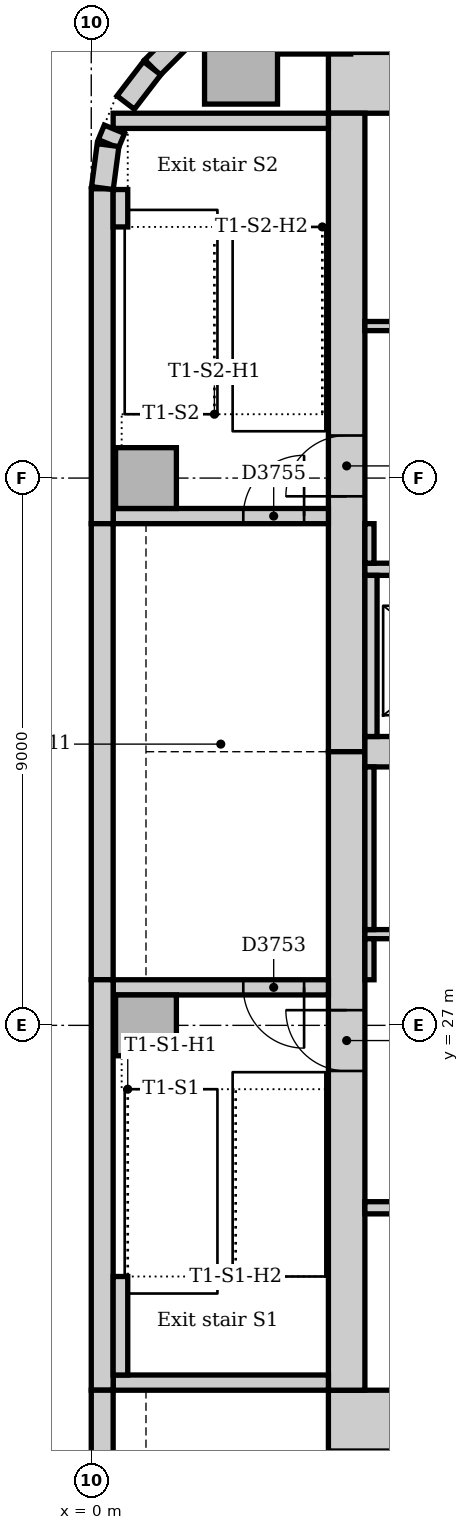
"""IFC4 building model, lengths in metres.
Left out: names, types, materials, properties, quantities, classifications, styles, units other than length and angle.
Written with IfcOpenShell. Run it as: python <this file> out.ifc"""

import sys

from ifc_helpers import new_model, si_unit, direction, frame, frame_2d, origin, origin_2d, place, context, subcontext, project, spatial, rectangle, extrude, element, fill, save


model = new_model("IFC4")
c1 = context("Model", 3, precision=1e-05, world=origin(), true_north=direction((0.0, 1.0)))
c2 = subcontext(c1, "Body", "Model", "MODEL_VIEW")
j1 = project(units=[si_unit("LENGTHUNIT", "METRE"), si_unit("PLANEANGLEUNIT", "RADIAN")], contexts=[c1])
p1 = place(None, origin())
s1 = spatial("IfcSite", under=j1, at=p1, CompositionType="ELEMENT")
p2 = place(p1, origin())
s2 = spatial("IfcBuilding", under=s1, at=p2, CompositionType="ELEMENT")
p3 = place(p2, frame((0.0, 0.0, 83.0)))
s3 = spatial("IfcBuildingStorey", under=s2, at=p3, CompositionType="ELEMENT", Elevation=83.0)
for number, where, z_axis, x_axis in (
    (1, (3.9, 20.5, 0.0), (0.0, 0.0, 1.0), (1.0, 0.0, 0.0)),
    (2, (23.5, 42.5, 0.0), (0.0, 0.0, 1.0), (-1.0, 0.0, 0.0)),
):
    element("IfcWall", number, at=place(p3, frame(where, z_axis=z_axis, x_axis=x_axis)), inside=s3, PredefinedType="SOLIDWALL", context=c2, shape_type="SweptSolid", body=[
        extrude(rectangle(XDim=19.6, YDim=1.0, at=frame_2d((9.8, 0.0))), origin(), (0.0, 0.0, 1.0), 4.0),
    ])
p4 = place(p3, frame((4.2, 42.0, 0.0), z_axis=(0.0, 0.0, 1.0), x_axis=(0.0, -1.0, 0.0)))
e3 = element("IfcWall", 3, at=p4, inside=s3, PredefinedType="SOLIDWALL", context=c2, shape_type="SweptSolid", body=[
    extrude(rectangle(XDim=10.5, YDim=0.6, at=frame_2d((5.25, 0.0))), origin(), (0.0, 0.0, 1.0), 4.0),
])
p5 = place(p4, frame((5.3, 0.0, 0.0)))
e4 = element("IfcOpeningElement", 4, at=p5, cuts=e3, PredefinedType="OPENING", context=c2, shape_type="SweptSolid", body=[
    extrude(rectangle(XDim=1.0, YDim=2.1, at=frame_2d((0.5, 1.05))), frame((0.0, 0.31, 0.0), z_axis=(0.0, -1.0, 0.0), x_axis=(1.0, 0.0, 0.0)), (0.0, 0.0, 1.0), 0.62),
])
p6 = place(p3, frame((4.2, 31.5, 0.0), z_axis=(0.0, 0.0, 1.0), x_axis=(0.0, -1.0, 0.0)))
e5 = element("IfcWall", 5, at=p6, inside=s3, PredefinedType="SOLIDWALL", context=c2, shape_type="SweptSolid", body=[
    extrude(rectangle(XDim=10.5, YDim=0.6, at=frame_2d((5.25, 0.0))), origin(), (0.0, 0.0, 1.0), 4.0),
])
p7 = place(p6, frame((4.25, 0.0, 0.0)))
e6 = element("IfcOpeningElement", 6, at=p7, cuts=e5, PredefinedType="OPENING", context=c2, shape_type="SweptSolid", body=[
    extrude(rectangle(XDim=1.0, YDim=2.1, at=frame_2d((0.5, 1.05))), frame((0.0, 0.31, 0.0), z_axis=(0.0, -1.0, 0.0), x_axis=(1.0, 0.0, 0.0)), (0.0, 0.0, 1.0), 0.62),
])
p8 = place(p3, frame((4.5, 31.5, 0.0), z_axis=(0.0, 0.0, 1.0), x_axis=(1.0, 0.0, 0.0)))
e7 = element("IfcWall", 7, at=p8, inside=s3, PredefinedType="SOLIDWALL", context=c2, shape_type="SweptSolid", body=[
    extrude(rectangle(XDim=18.0, YDim=0.5, at=frame_2d((9.0, 0.0))), origin(), (0.0, 0.0, 1.0), 4.0),
])
p9 = place(p3, frame((0.36, 21.125, 0.0), z_axis=(0.0, 0.0, 1.0), x_axis=(1.0, 0.0, 0.0)))
e8 = element("IfcWall", 8, at=p9, inside=s3, PredefinedType="SOLIDWALL", context=c2, shape_type="SweptSolid", body=[
    extrude(rectangle(XDim=3.54, YDim=0.25, at=frame_2d((1.77, 0.0))), origin(), (0.0, 0.0, 1.0), 4.0),
])
p10 = place(p3, frame((3.9, 27.625, 0.0), z_axis=(0.0, 0.0, 1.0), x_axis=(-1.0, 0.0, 0.0)))
e9 = element("IfcWall", 9, at=p10, inside=s3, PredefinedType="SOLIDWALL", context=c2, shape_type="SweptSolid", body=[
    extrude(rectangle(XDim=3.54, YDim=0.25, at=frame_2d((1.77, 0.0))), origin(), (0.0, 0.0, 1.0), 4.0),
])
p11 = place(p10, frame((0.4, 0.0, 0.0)))
e10 = element("IfcOpeningElement", 10, at=p11, cuts=e9, PredefinedType="OPENING", context=c2, shape_type="SweptSolid", body=[
    extrude(rectangle(XDim=1.0, YDim=2.1, at=frame_2d((0.5, 1.05))), frame((0.0, 0.135, 0.0), z_axis=(0.0, -1.0, 0.0), x_axis=(1.0, 0.0, 0.0)), (0.0, 0.0, 1.0), 0.27),
])
p12 = place(p3, frame((0.36, 35.375, 0.0), z_axis=(0.0, 0.0, 1.0), x_axis=(1.0, 0.0, 0.0)))
e11 = element("IfcWall", 11, at=p12, inside=s3, PredefinedType="SOLIDWALL", context=c2, shape_type="SweptSolid", body=[
    extrude(rectangle(XDim=3.54, YDim=0.25, at=frame_2d((1.77, 0.0))), origin(), (0.0, 0.0, 1.0), 4.0),
])
p13 = place(p12, frame((2.14, 0.0, 0.0)))
e12 = element("IfcOpeningElement", 12, at=p13, cuts=e11, PredefinedType="OPENING", context=c2, shape_type="SweptSolid", body=[
    extrude(rectangle(XDim=1.0, YDim=2.1, at=frame_2d((0.5, 1.05))), frame((0.0, 0.135, 0.0), z_axis=(0.0, -1.0, 0.0), x_axis=(1.0, 0.0, 0.0)), (0.0, 0.0, 1.0), 0.27),
])
p14 = place(p3, frame((3.9, 41.875, 0.0), z_axis=(0.0, 0.0, 1.0), x_axis=(-1.0, 0.0, 0.0)))
e13 = element("IfcWall", 13, at=p14, inside=s3, PredefinedType="SOLIDWALL", context=c2, shape_type="SweptSolid", body=[
    extrude(rectangle(XDim=3.54, YDim=0.25, at=frame_2d((1.77, 0.0))), origin(), (0.0, 0.0, 1.0), 4.0),
])
for number, where, z_axis, x_axis in (
    (14, (3.667, 43.574, 0.0), (0.0, 0.0, 1.0), (1.0, 0.0, 0.0)),
    (15, (2.463, 42.75, 0.0), (0.0, 0.0, 1.0), (1.0, 0.0, 0.0)),
):
    element("IfcColumn", number, at=place(p3, frame(where, z_axis=z_axis, x_axis=x_axis)), inside=s3, PredefinedType="COLUMN", context=c2, shape_type="SweptSolid", body=[
        extrude(rectangle(XDim=1.2, YDim=1.2, at=origin_2d()), origin(), (0.0, 0.0, 1.0), 3.85),
    ])
for number, where, z_axis, x_axis in (
    (16, (0.9, 27.0, 0.0), (0.0, 0.0, 1.0), (1.0, 0.0, 0.0)),
    (17, (0.9, 36.0, 0.0), (0.0, 0.0, 1.0), (1.0, 0.0, 0.0)),
):
    element("IfcColumn", number, at=place(p3, frame(where, z_axis=z_axis, x_axis=x_axis)), inside=s3, PredefinedType="COLUMN", context=c2, shape_type="SweptSolid", body=[
        extrude(rectangle(XDim=1.0, YDim=1.0, at=origin_2d()), origin(), (0.0, 0.0, 1.0), 4.0),
    ])
p15 = place(p3, frame((2.249, 43.994, 0.0), z_axis=(0.0, 0.0, 1.0), x_axis=(-0.707106781187, -0.707106781187, 0.0)))
e18 = element("IfcWall", 18, at=p15, inside=s3, PredefinedType="STANDARD", context=c2, shape_type="SweptSolid", body=[
    extrude(rectangle(XDim=1.757, YDim=0.36, at=frame_2d((0.879, 0.0))), origin(), (0.0, 0.0, 1.0), 3.85),
])
p16 = place(p3, frame((0.18, 40.757, 0.0), z_axis=(0.0, 0.0, 1.0), x_axis=(0.0, -1.0, 0.0)))
e19 = element("IfcWall", 19, at=p16, inside=s3, PredefinedType="STANDARD", context=c2, shape_type="SweptSolid", body=[
    extrude(rectangle(XDim=5.507, YDim=0.36, at=frame_2d((2.754, 0.0))), origin(), (0.0, 0.0, 1.0), 3.85),
])
p17 = place(p3, frame((0.18, 35.25, 0.0), z_axis=(0.0, 0.0, 1.0), x_axis=(0.0, -1.0, 0.0)))
e20 = element("IfcWall", 20, at=p17, inside=s3, PredefinedType="STANDARD", context=c2, shape_type="SweptSolid", body=[
    extrude(rectangle(XDim=7.5, YDim=0.36, at=frame_2d((3.75, 0.0))), origin(), (0.0, 0.0, 1.0), 3.85),
])
p18 = place(p3, frame((0.18, 27.75, 0.0), z_axis=(0.0, 0.0, 1.0), x_axis=(0.0, -1.0, 0.0)))
e21 = element("IfcWall", 21, at=p18, inside=s3, PredefinedType="STANDARD", context=c2, shape_type="SweptSolid", body=[
    extrude(rectangle(XDim=6.75, YDim=0.36, at=frame_2d((3.375, 0.0))), origin(), (0.0, 0.0, 1.0), 3.85),
])
p19 = place(p3, frame((0.18, 21.0, 0.0), z_axis=(0.0, 0.0, 1.0), x_axis=(0.0, -1.0, 0.0)))
e22 = element("IfcWall", 22, at=p19, inside=s3, PredefinedType="STANDARD", context=c2, shape_type="SweptSolid", body=[
    extrude(rectangle(XDim=16.757, YDim=0.36, at=frame_2d((8.379, 0.0))), origin(), (0.0, 0.0, 1.0), 3.85),
])
p20 = place(p19, frame((1.35, 0.0, 0.9)))
e23 = element("IfcOpeningElement", 23, at=p20, cuts=e22, PredefinedType="OPENING", context=c2, shape_type="SweptSolid", body=[
    extrude(rectangle(XDim=3.3, YDim=1.6, at=frame_2d((1.65, 0.8))), frame((0.0, 0.19, 0.0), z_axis=(0.0, -1.0, 0.0), x_axis=(1.0, 0.0, 0.0)), (0.0, 0.0, 1.0), 0.38),
])
p21 = place(p19, frame((5.85, 0.0, 0.9)))
e24 = element("IfcOpeningElement", 24, at=p21, cuts=e22, PredefinedType="OPENING", context=c2, shape_type="SweptSolid", body=[
    extrude(rectangle(XDim=3.3, YDim=1.6, at=frame_2d((1.65, 0.8))), frame((0.0, 0.19, 0.0), z_axis=(0.0, -1.0, 0.0), x_axis=(1.0, 0.0, 0.0)), (0.0, 0.0, 1.0), 0.38),
])
p22 = place(p19, frame((10.35, 0.0, 0.9)))
e25 = element("IfcOpeningElement", 25, at=p22, cuts=e22, PredefinedType="OPENING", context=c2, shape_type="SweptSolid", body=[
    extrude(rectangle(XDim=3.3, YDim=1.6, at=frame_2d((1.65, 0.8))), frame((0.0, 0.19, 0.0), z_axis=(0.0, -1.0, 0.0), x_axis=(1.0, 0.0, 0.0)), (0.0, 0.0, 1.0), 0.38),
])
p23 = place(p3, frame((1.0, 42.741, 0.0), z_axis=(0.0, 0.0, 1.0), x_axis=(-0.608802368033, -0.793321924995, 0.0)))
e26 = element("IfcWall", 26, at=p23, inside=s3, PredefinedType="STANDARD", context=c2, shape_type="SweptSolid", body=[
    extrude(rectangle(XDim=0.713, YDim=0.36, at=frame_2d((0.357, 0.0))), origin(), (0.0, 0.0, 1.0), 3.85),
])
p24 = place(p3, frame((0.381, 41.736, 0.0), z_axis=(0.0, 0.0, 1.0), x_axis=(-0.382773360986, -0.923842277729, 0.0)))
e27 = element("IfcWall", 27, at=p24, inside=s3, PredefinedType="STANDARD", context=c2, shape_type="SweptSolid", body=[
    extrude(rectangle(XDim=0.258, YDim=0.36, at=frame_2d((0.129, 0.0))), origin(), (0.0, 0.0, 1.0), 3.85),
])
p25 = place(p3, frame((0.276, 41.476, 0.0), z_axis=(0.0, 0.0, 1.0), x_axis=(-0.13055608231, -0.99144092581, 0.0)))
e28 = element("IfcWall", 28, at=p25, inside=s3, PredefinedType="STANDARD", context=c2, shape_type="SweptSolid", body=[
    extrude(rectangle(XDim=0.713, YDim=0.36, at=frame_2d((0.356, 0.0))), origin(), (0.0, 0.0, 1.0), 3.85),
])
p26 = place(p3, frame((0.48, 21.25, 0.0), z_axis=(0.0, 0.0, 1.0), x_axis=(0.0, 1.0, 0.0)))
e29 = element("IfcWall", 29, at=p26, inside=s3, PredefinedType="STANDARD", context=c2, shape_type="SweptSolid", body=[
    extrude(rectangle(XDim=1.62, YDim=0.24, at=frame_2d((0.81, 0.0))), origin(), (0.0, 0.0, 1.0), 4.0),
])
p27 = place(p3, frame((0.48, 40.13, 0.0), z_axis=(0.0, 0.0, 1.0), x_axis=(0.0, 1.0, 0.0)))
e30 = element("IfcWall", 30, at=p27, inside=s3, PredefinedType="STANDARD", context=c2, shape_type="SweptSolid", body=[
    extrude(rectangle(XDim=0.615, YDim=0.24, at=frame_2d((0.307, 0.0))), origin(), (0.0, 0.0, 1.0), 4.0),
])
p28 = place(p3, frame((4.5, 24.0, 0.0), z_axis=(0.0, 0.0, 1.0), x_axis=(1.0, 0.0, 0.0)))
e31 = element("IfcWall", 31, at=p28, inside=s3, PredefinedType="PARTITIONING", context=c2, shape_type="SweptSolid", body=[
    extrude(rectangle(XDim=18.0, YDim=0.2, at=frame_2d((9.0, 0.0))), origin(), (0.0, 0.0, 1.0), 3.85),
])
p29 = place(p28, frame((0.95, 0.0, 0.0)))
e32 = element("IfcOpeningElement", 32, at=p29, cuts=e31, PredefinedType="OPENING", context=c2, shape_type="SweptSolid", body=[
    extrude(rectangle(XDim=1.1, YDim=2.1, at=frame_2d((0.55, 1.05))), frame((0.0, 0.11, 0.0), z_axis=(0.0, -1.0, 0.0), x_axis=(1.0, 0.0, 0.0)), (0.0, 0.0, 1.0), 0.22),
])
p30 = place(p28, frame((3.95, 0.0, 0.0)))
e33 = element("IfcOpeningElement", 33, at=p30, cuts=e31, PredefinedType="OPENING", context=c2, shape_type="SweptSolid", body=[
    extrude(rectangle(XDim=1.1, YDim=2.1, at=frame_2d((0.55, 1.05))), frame((0.0, 0.11, 0.0), z_axis=(0.0, -1.0, 0.0), x_axis=(1.0, 0.0, 0.0)), (0.0, 0.0, 1.0), 0.22),
])
p31 = place(p28, frame((6.95, 0.0, 0.0)))
e34 = element("IfcOpeningElement", 34, at=p31, cuts=e31, PredefinedType="OPENING", context=c2, shape_type="SweptSolid", body=[
    extrude(rectangle(XDim=1.1, YDim=2.1, at=frame_2d((0.55, 1.05))), frame((0.0, 0.11, 0.0), z_axis=(0.0, -1.0, 0.0), x_axis=(1.0, 0.0, 0.0)), (0.0, 0.0, 1.0), 0.22),
])
p32 = place(p28, frame((9.95, 0.0, 0.0)))
e35 = element("IfcOpeningElement", 35, at=p32, cuts=e31, PredefinedType="OPENING", context=c2, shape_type="SweptSolid", body=[
    extrude(rectangle(XDim=1.1, YDim=2.1, at=frame_2d((0.55, 1.05))), frame((0.0, 0.11, 0.0), z_axis=(0.0, -1.0, 0.0), x_axis=(1.0, 0.0, 0.0)), (0.0, 0.0, 1.0), 0.22),
])
p33 = place(p28, frame((12.95, 0.0, 0.0)))
e36 = element("IfcOpeningElement", 36, at=p33, cuts=e31, PredefinedType="OPENING", context=c2, shape_type="SweptSolid", body=[
    extrude(rectangle(XDim=1.1, YDim=2.1, at=frame_2d((0.55, 1.05))), frame((0.0, 0.11, 0.0), z_axis=(0.0, -1.0, 0.0), x_axis=(1.0, 0.0, 0.0)), (0.0, 0.0, 1.0), 0.22),
])
p34 = place(p28, frame((15.95, 0.0, 0.0)))
e37 = element("IfcOpeningElement", 37, at=p34, cuts=e31, PredefinedType="OPENING", context=c2, shape_type="SweptSolid", body=[
    extrude(rectangle(XDim=1.1, YDim=2.1, at=frame_2d((0.55, 1.05))), frame((0.0, 0.11, 0.0), z_axis=(0.0, -1.0, 0.0), x_axis=(1.0, 0.0, 0.0)), (0.0, 0.0, 1.0), 0.22),
])
p35 = place(p3, frame((4.5, 34.5, 0.0), z_axis=(0.0, 0.0, 1.0), x_axis=(1.0, 0.0, 0.0)))
e38 = element("IfcWall", 38, at=p35, inside=s3, PredefinedType="PARTITIONING", context=c2, shape_type="SweptSolid", body=[
    extrude(rectangle(XDim=18.0, YDim=0.2, at=frame_2d((9.0, 0.0))), origin(), (0.0, 0.0, 1.0), 3.85),
])
p36 = place(p35, frame((0.95, 0.0, 0.0)))
e39 = element("IfcOpeningElement", 39, at=p36, cuts=e38, PredefinedType="OPENING", context=c2, shape_type="SweptSolid", body=[
    extrude(rectangle(XDim=1.1, YDim=2.1, at=frame_2d((0.55, 1.05))), frame((0.0, 0.11, 0.0), z_axis=(0.0, -1.0, 0.0), x_axis=(1.0, 0.0, 0.0)), (0.0, 0.0, 1.0), 0.22),
])
p37 = place(p35, frame((3.95, 0.0, 0.0)))
e40 = element("IfcOpeningElement", 40, at=p37, cuts=e38, PredefinedType="OPENING", context=c2, shape_type="SweptSolid", body=[
    extrude(rectangle(XDim=1.1, YDim=2.1, at=frame_2d((0.55, 1.05))), frame((0.0, 0.11, 0.0), z_axis=(0.0, -1.0, 0.0), x_axis=(1.0, 0.0, 0.0)), (0.0, 0.0, 1.0), 0.22),
])
p38 = place(p35, frame((12.95, 0.0, 0.0)))
e41 = element("IfcOpeningElement", 41, at=p38, cuts=e38, PredefinedType="OPENING", context=c2, shape_type="SweptSolid", body=[
    extrude(rectangle(XDim=1.1, YDim=2.1, at=frame_2d((0.55, 1.05))), frame((0.0, 0.11, 0.0), z_axis=(0.0, -1.0, 0.0), x_axis=(1.0, 0.0, 0.0)), (0.0, 0.0, 1.0), 0.22),
])
p39 = place(p35, frame((15.95, 0.0, 0.0)))
e42 = element("IfcOpeningElement", 42, at=p39, cuts=e38, PredefinedType="OPENING", context=c2, shape_type="SweptSolid", body=[
    extrude(rectangle(XDim=1.1, YDim=2.1, at=frame_2d((0.55, 1.05))), frame((0.0, 0.11, 0.0), z_axis=(0.0, -1.0, 0.0), x_axis=(1.0, 0.0, 0.0)), (0.0, 0.0, 1.0), 0.22),
])
p40 = place(p3, frame((4.6, 31.75, 0.0), z_axis=(0.0, 0.0, 1.0), x_axis=(0.0, 1.0, 0.0)))
e43 = element("IfcWall", 43, at=p40, inside=s3, PredefinedType="PARTITIONING", context=c2, shape_type="SweptSolid", body=[
    extrude(rectangle(XDim=2.65, YDim=0.2, at=frame_2d((1.325, 0.0))), origin(), (0.0, 0.0, 1.0), 3.85),
])
p41 = place(p3, frame((4.5, 28.5, 0.0), z_axis=(0.0, 0.0, 1.0), x_axis=(1.0, 0.0, 0.0)))
e44 = element("IfcWall", 44, at=p41, inside=s3, PredefinedType="PARTITIONING", context=c2, shape_type="SweptSolid", body=[
    extrude(rectangle(XDim=18.0, YDim=0.15, at=frame_2d((9.0, 0.0))), origin(), (0.0, 0.0, 1.0), 3.85),
])
p42 = place(p41, frame((1.1, 0.0, 0.0)))
e45 = element("IfcOpeningElement", 45, at=p42, cuts=e44, PredefinedType="OPENING", context=c2, shape_type="SweptSolid", body=[
    extrude(rectangle(XDim=0.9, YDim=2.1, at=frame_2d((0.45, 1.05))), frame((0.0, 0.085, 0.0), z_axis=(0.0, -1.0, 0.0), x_axis=(1.0, 0.0, 0.0)), (0.0, 0.0, 1.0), 0.17),
])
p43 = place(p41, frame((7.05, 0.0, 0.0)))
e46 = element("IfcOpeningElement", 46, at=p43, cuts=e44, PredefinedType="OPENING", context=c2, shape_type="SweptSolid", body=[
    extrude(rectangle(XDim=0.9, YDim=2.1, at=frame_2d((0.45, 1.05))), frame((0.0, 0.085, 0.0), z_axis=(0.0, -1.0, 0.0), x_axis=(1.0, 0.0, 0.0)), (0.0, 0.0, 1.0), 0.17),
])
p44 = place(p41, frame((14.45, 0.0, 0.0)))
e47 = element("IfcOpeningElement", 47, at=p44, cuts=e44, PredefinedType="OPENING", context=c2, shape_type="SweptSolid", body=[
    extrude(rectangle(XDim=0.9, YDim=2.1, at=frame_2d((0.45, 1.05))), frame((0.0, 0.085, 0.0), z_axis=(0.0, -1.0, 0.0), x_axis=(1.0, 0.0, 0.0)), (0.0, 0.0, 1.0), 0.17),
])
p45 = place(p3, frame((4.5, 38.5, 0.0), z_axis=(0.0, 0.0, 1.0), x_axis=(1.0, 0.0, 0.0)))
e48 = element("IfcWall", 48, at=p45, inside=s3, PredefinedType="PARTITIONING", context=c2, shape_type="SweptSolid", body=[
    extrude(rectangle(XDim=11.9, YDim=0.15, at=frame_2d((5.95, 0.0))), origin(), (0.0, 0.0, 1.0), 3.85),
])
p46 = place(p45, frame((1.1, 0.0, 0.0)))
e49 = element("IfcOpeningElement", 49, at=p46, cuts=e48, PredefinedType="OPENING", context=c2, shape_type="SweptSolid", body=[
    extrude(rectangle(XDim=0.9, YDim=2.1, at=frame_2d((0.45, 1.05))), frame((0.0, 0.085, 0.0), z_axis=(0.0, -1.0, 0.0), x_axis=(1.0, 0.0, 0.0)), (0.0, 0.0, 1.0), 0.17),
])
p47 = place(p45, frame((4.8, 0.0, 0.0)))
e50 = element("IfcOpeningElement", 50, at=p47, cuts=e48, PredefinedType="OPENING", context=c2, shape_type="SweptSolid", body=[
    extrude(rectangle(XDim=0.9, YDim=2.1, at=frame_2d((0.45, 1.05))), frame((0.0, 0.085, 0.0), z_axis=(0.0, -1.0, 0.0), x_axis=(1.0, 0.0, 0.0)), (0.0, 0.0, 1.0), 0.17),
])
p48 = place(p45, frame((7.8, 0.0, 0.0)))
e51 = element("IfcOpeningElement", 51, at=p48, cuts=e48, PredefinedType="OPENING", context=c2, shape_type="SweptSolid", body=[
    extrude(rectangle(XDim=0.9, YDim=2.1, at=frame_2d((0.45, 1.05))), frame((0.0, 0.085, 0.0), z_axis=(0.0, -1.0, 0.0), x_axis=(1.0, 0.0, 0.0)), (0.0, 0.0, 1.0), 0.17),
])
p49 = place(p45, frame((9.95, 0.0, 0.0)))
e52 = element("IfcOpeningElement", 52, at=p49, cuts=e48, PredefinedType="OPENING", context=c2, shape_type="SweptSolid", body=[
    extrude(rectangle(XDim=0.8, YDim=2.1, at=frame_2d((0.4, 1.05))), frame((0.0, 0.085, 0.0), z_axis=(0.0, -1.0, 0.0), x_axis=(1.0, 0.0, 0.0)), (0.0, 0.0, 1.0), 0.17),
])
p50 = place(p3, frame((4.575, 27.75, 0.0), z_axis=(0.0, 0.0, 1.0), x_axis=(0.0, 1.0, 0.0)))
e53 = element("IfcWall", 53, at=p50, inside=s3, PredefinedType="PARTITIONING", context=c2, shape_type="SweptSolid", body=[
    extrude(rectangle(XDim=0.675, YDim=0.15, at=frame_2d((0.338, 0.0))), origin(), (0.0, 0.0, 1.0), 3.85),
])
p51 = place(p3, frame((4.575, 28.575, 0.0), z_axis=(0.0, 0.0, 1.0), x_axis=(0.0, 1.0, 0.0)))
e54 = element("IfcWall", 54, at=p51, inside=s3, PredefinedType="PARTITIONING", context=c2, shape_type="SweptSolid", body=[
    extrude(rectangle(XDim=2.675, YDim=0.15, at=frame_2d((1.337, 0.0))), origin(), (0.0, 0.0, 1.0), 3.85),
])
p52 = place(p3, frame((4.575, 34.6, 0.0), z_axis=(0.0, 0.0, 1.0), x_axis=(0.0, 1.0, 0.0)))
e55 = element("IfcWall", 55, at=p52, inside=s3, PredefinedType="PARTITIONING", context=c2, shape_type="SweptSolid", body=[
    extrude(rectangle(XDim=0.65, YDim=0.15, at=frame_2d((0.325, 0.0))), origin(), (0.0, 0.0, 1.0), 3.85),
])
p53 = place(p7, frame((1.0, 0.0, 0.0), z_axis=(0.0, 0.0, 1.0), x_axis=(-1.0, 0.0, 0.0)))
e56 = element("IfcDoor", 56, at=p53, inside=s3, OperationType="SINGLE_SWING_RIGHT", PredefinedType="DOOR", context=c2, shape_type="SweptSolid", body=[
    extrude(rectangle(XDim=1.0, YDim=2.1, at=frame_2d((0.5, 1.05))), frame((0.0, 0.025, 0.0), z_axis=(0.0, -1.0, 0.0), x_axis=(1.0, 0.0, 0.0)), (0.0, 0.0, 1.0), 0.05),
])
fill(e6, e56)
p54 = place(p11, origin())
e57 = element("IfcDoor", 57, at=p54, inside=s3, OperationType="SINGLE_SWING_LEFT", PredefinedType="DOOR", context=c2, shape_type="SweptSolid", body=[
    extrude(rectangle(XDim=1.0, YDim=2.1, at=frame_2d((0.5, 1.05))), frame((0.0, 0.025, 0.0), z_axis=(0.0, -1.0, 0.0), x_axis=(1.0, 0.0, 0.0)), (0.0, 0.0, 1.0), 0.05),
])
fill(e10, e57)
p55 = place(p5, frame((1.0, 0.0, 0.0), z_axis=(0.0, 0.0, 1.0), x_axis=(-1.0, 0.0, 0.0)))
e58 = element("IfcDoor", 58, at=p55, inside=s3, OperationType="SINGLE_SWING_LEFT", PredefinedType="DOOR", context=c2, shape_type="SweptSolid", body=[
    extrude(rectangle(XDim=1.0, YDim=2.1, at=frame_2d((0.5, 1.05))), frame((0.0, 0.025, 0.0), z_axis=(0.0, -1.0, 0.0), x_axis=(1.0, 0.0, 0.0)), (0.0, 0.0, 1.0), 0.05),
])
fill(e4, e58)
p56 = place(p13, origin())
e59 = element("IfcDoor", 59, at=p56, inside=s3, OperationType="SINGLE_SWING_RIGHT", PredefinedType="DOOR", context=c2, shape_type="SweptSolid", body=[
    extrude(rectangle(XDim=1.0, YDim=2.1, at=frame_2d((0.5, 1.05))), frame((0.0, 0.025, 0.0), z_axis=(0.0, -1.0, 0.0), x_axis=(1.0, 0.0, 0.0)), (0.0, 0.0, 1.0), 0.05),
])
fill(e12, e59)
save(model, sys.argv[1])
